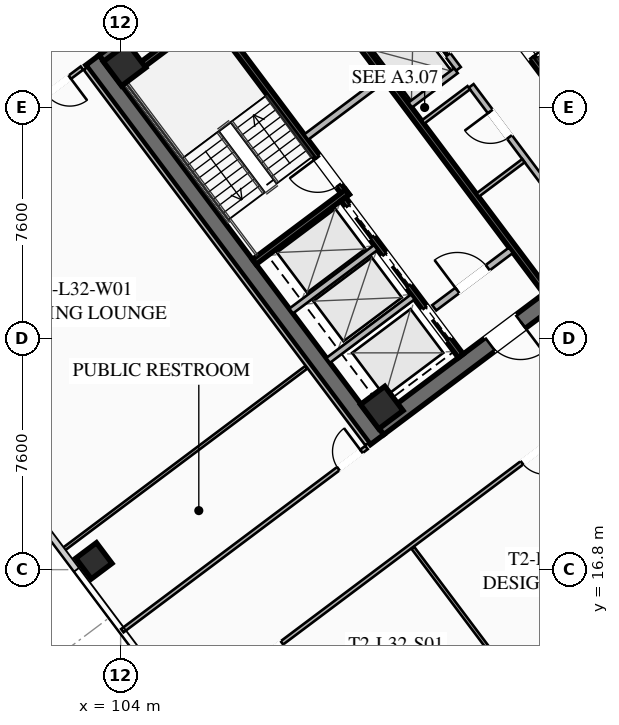
"""IFC4 building model, lengths in metres.
Left out: names, types, materials, properties, quantities, classifications, styles, units other than length and angle.
Written with IfcOpenShell. Run it as: python <this file> out.ifc"""

import sys

from ifc_helpers import new_model, si_unit, direction, frame, frame_2d, origin, origin_2d, place, context, subcontext, project, spatial, rectangle, hollow_rectangle, extrude, element, fill, save


model = new_model("IFC4")
c1 = context("Model", 3, precision=1e-05, world=origin(), true_north=direction((0.0, 1.0)))
c2 = subcontext(c1, "Body", "Model", "MODEL_VIEW")
j1 = project(units=[si_unit("LENGTHUNIT", "METRE"), si_unit("PLANEANGLEUNIT", "RADIAN")], contexts=[c1])
p1 = place(None, origin())
s1 = spatial("IfcSite", under=j1, at=p1, CompositionType="ELEMENT")
p2 = place(p1, origin())
s2 = spatial("IfcBuilding", under=s1, at=p2, CompositionType="ELEMENT")
p3 = place(p2, frame((0.0, 0.0, 121.5)))
s3 = spatial("IfcBuildingStorey", under=s2, at=p3, CompositionType="ELEMENT", Elevation=121.5)
for number, where, z_axis, x_axis in (
    (1, (112.436, 21.077, 0.0), (0.0, 0.0, 1.0), (-0.6, 0.8, 0.0)),
    (2, (115.564, 42.923, 0.0), (0.0, 0.0, 1.0), (0.6, -0.8, 0.0)),
):
    element("IfcWall", number, at=place(p3, frame(where, z_axis=z_axis, x_axis=x_axis)), inside=s3, PredefinedType="SHEAR", context=c2, shape_type="SweptSolid", body=[
        extrude(rectangle(XDim=15.6, YDim=0.55, at=frame_2d((7.8, 0.0))), origin(), (0.0, 0.0, 1.0), 3.55),
    ])
p4 = place(p3, frame((124.539, 30.498, 0.0), z_axis=(0.0, 0.0, 1.0), x_axis=(-0.799998054672, -0.600002593761, 0.0)))
e3 = element("IfcWall", 3, at=p4, inside=s3, PredefinedType="SHEAR", context=c2, shape_type="SweptSolid", body=[
    extrude(rectangle(XDim=15.06, YDim=0.55, at=frame_2d((7.53, 0.0))), origin(), (0.0, 0.0, 1.0), 3.55),
])
p5 = place(p4, frame((9.23, 0.0, 0.0)))
e4 = element("IfcOpeningElement", 4, at=p5, cuts=e3, PredefinedType="OPENING", context=c2, shape_type="SweptSolid", body=[
    extrude(rectangle(XDim=1.25, YDim=2.25, at=frame_2d((0.625, 1.125))), frame((0.0, 0.285, 0.0), z_axis=(0.0, -1.0, 0.0), x_axis=(1.0, 0.0, 0.0)), (0.0, 0.0, 1.0), 0.57),
])
p6 = place(p4, frame((4.18, 0.0, 0.0)))
e5 = element("IfcOpeningElement", 5, at=p6, cuts=e3, PredefinedType="OPENING", context=c2, shape_type="SweptSolid", body=[
    extrude(rectangle(XDim=1.25, YDim=2.25, at=frame_2d((0.625, 1.125))), frame((0.0, 0.285, 0.0), z_axis=(0.0, -1.0, 0.0), x_axis=(1.0, 0.0, 0.0)), (0.0, 0.0, 1.0), 0.57),
])
p7 = place(p3, frame((103.461, 33.502, 0.0), z_axis=(0.0, 0.0, 1.0), x_axis=(0.799998054672, 0.600002593761, 0.0)))
e6 = element("IfcWall", 6, at=p7, inside=s3, PredefinedType="SHEAR", context=c2, shape_type="SweptSolid", body=[
    extrude(rectangle(XDim=15.06, YDim=0.55, at=frame_2d((7.53, 0.0))), origin(), (0.0, 0.0, 1.0), 3.55),
])
p8 = place(p7, frame((4.58, 0.0, 0.0)))
e7 = element("IfcOpeningElement", 7, at=p8, cuts=e6, PredefinedType="OPENING", context=c2, shape_type="SweptSolid", body=[
    extrude(rectangle(XDim=1.25, YDim=2.25, at=frame_2d((0.625, 1.125))), frame((0.0, 0.285, 0.0), z_axis=(0.0, -1.0, 0.0), x_axis=(1.0, 0.0, 0.0)), (0.0, 0.0, 1.0), 0.57),
])
p9 = place(p7, frame((9.63, 0.0, 0.0)))
e8 = element("IfcOpeningElement", 8, at=p9, cuts=e6, PredefinedType="OPENING", context=c2, shape_type="SweptSolid", body=[
    extrude(rectangle(XDim=1.25, YDim=2.25, at=frame_2d((0.625, 1.125))), frame((0.0, 0.285, 0.0), z_axis=(0.0, -1.0, 0.0), x_axis=(1.0, 0.0, 0.0)), (0.0, 0.0, 1.0), 0.57),
])
for number, where, z_axis, x_axis in (
    (9, (112.59, 22.13, 0.0), (0.0, 0.0, 1.0), (0.8, 0.6, 0.0)),
    (10, (104.13, 33.41, 0.0), (0.0, 0.0, 1.0), (0.8, 0.6, 0.0)),
):
    element("IfcColumn", number, at=place(p3, frame(where, z_axis=z_axis, x_axis=x_axis)), inside=s3, PredefinedType="COLUMN", context=c2, shape_type="SweptSolid", body=[
        extrude(hollow_rectangle(XDim=1.0, YDim=1.0, WallThickness=0.04, at=origin_2d()), origin(), (0.0, 0.0, 1.0), 3.37),
    ])
p10 = place(p3, frame((103.12, 17.09, 0.0), z_axis=(0.0, 0.0, 1.0), x_axis=(0.799999996291, 0.600000004945, 0.0)))
e11 = element("IfcColumn", 11, at=p10, inside=s3, PredefinedType="COLUMN", context=c2, shape_type="SweptSolid", body=[
    extrude(hollow_rectangle(XDim=0.85, YDim=0.85, WallThickness=0.035, at=origin_2d()), origin(), (0.0, 0.0, 1.0), 3.37),
])
p11 = place(p3, frame((111.44, 29.08, 0.0), z_axis=(0.0, 0.0, 1.0), x_axis=(-0.59999029481, 0.8000072788, 0.0)))
e12 = element("IfcWall", 12, at=p11, inside=s3, PredefinedType="SHEAR", context=c2, shape_type="SweptSolid", body=[
    extrude(rectangle(XDim=8.05, YDim=0.2, at=frame_2d((4.025, 0.0))), origin(), (0.0, 0.0, 1.0), 3.37),
])
p12 = place(p11, frame((0.45, 0.0, 0.0)))
e13 = element("IfcOpeningElement", 13, at=p12, cuts=e12, PredefinedType="OPENING", context=c2, shape_type="SweptSolid", body=[
    extrude(rectangle(XDim=1.15, YDim=2.2, at=frame_2d((0.575, 1.1))), frame((0.0, 0.11, 0.0), z_axis=(0.0, -1.0, 0.0), x_axis=(1.0, 0.0, 0.0)), (0.0, 0.0, 1.0), 0.22),
])
for number, where, z_axis, x_axis in (
    (14, (108.396, 26.922, 0.0), (0.0, 0.0, 1.0), (0.8, 0.6, 0.0)),
    (15, (103.956, 32.842, 0.0), (0.0, 0.0, 1.0), (0.8, 0.6, 0.0)),
):
    element("IfcWall", number, at=place(p3, frame(where, z_axis=z_axis, x_axis=x_axis)), inside=s3, PredefinedType="SHEAR", context=c2, shape_type="SweptSolid", body=[
        extrude(rectangle(XDim=3.83, YDim=0.2, at=frame_2d((1.915, 0.0))), origin(), (0.0, 0.0, 1.0), 3.37),
    ])
p13 = place(p3, frame((116.56, 34.92, 0.0), z_axis=(0.0, 0.0, 1.0), x_axis=(0.59999029481, -0.8000072788, 0.0)))
e16 = element("IfcWall", 16, at=p13, inside=s3, PredefinedType="SHEAR", context=c2, shape_type="SweptSolid", body=[
    extrude(rectangle(XDim=8.05, YDim=0.2, at=frame_2d((4.025, 0.0))), origin(), (0.0, 0.0, 1.0), 3.37),
])
p14 = place(p13, frame((0.45, 0.0, 0.0)))
e17 = element("IfcOpeningElement", 17, at=p14, cuts=e16, PredefinedType="OPENING", context=c2, shape_type="SweptSolid", body=[
    extrude(rectangle(XDim=1.15, YDim=2.2, at=frame_2d((0.575, 1.1))), frame((0.0, 0.11, 0.0), z_axis=(0.0, -1.0, 0.0), x_axis=(1.0, 0.0, 0.0)), (0.0, 0.0, 1.0), 0.22),
])
p15 = place(p3, frame((117.998, 25.936, 0.0), z_axis=(0.0, 0.0, 1.0), x_axis=(-0.600002693989, 0.799997979501, 0.0)))
e18 = element("IfcWall", 18, at=p15, inside=s3, PredefinedType="SHEAR", context=c2, shape_type="SweptSolid", body=[
    extrude(rectangle(XDim=14.5, YDim=0.2, at=frame_2d((7.25, 0.0))), origin(), (0.0, 0.0, 1.0), 3.37),
])
p16 = place(p3, frame((110.104, 31.028, 0.0), z_axis=(0.0, 0.0, 1.0), x_axis=(0.800018601094, 0.59997519774, 0.0)))
e19 = element("IfcWall", 19, at=p16, inside=s3, PredefinedType="SOLIDWALL", context=c2, shape_type="SweptSolid", body=[
    extrude(rectangle(XDim=3.15, YDim=0.22, at=frame_2d((1.575, 0.0))), origin(), (0.0, 0.0, 1.0), 2.723),
])
p17 = place(p3, frame((114.316, 25.412, 0.0), z_axis=(0.0, 0.0, 1.0), x_axis=(0.800018601094, 0.59997519774, 0.0)))
e20 = element("IfcWall", 20, at=p17, inside=s3, PredefinedType="SOLIDWALL", context=c2, shape_type="SweptSolid", body=[
    extrude(rectangle(XDim=3.15, YDim=0.22, at=frame_2d((1.575, 0.0))), origin(), (0.0, 0.0, 1.0), 2.723),
])
p18 = place(p17, frame((0.95, 0.0, 0.0)))
e21 = element("IfcOpeningElement", 21, at=p18, cuts=e20, PredefinedType="OPENING", context=c2, shape_type="SweptSolid", body=[
    extrude(rectangle(XDim=1.25, YDim=2.25, at=frame_2d((0.625, 1.125))), frame((0.0, 0.12, 0.0), z_axis=(0.0, -1.0, 0.0), x_axis=(1.0, 0.0, 0.0)), (0.0, 0.0, 1.0), 0.24),
])
p19 = place(p3, frame((115.19, 23.83, 0.0), z_axis=(0.0, 0.0, 1.0), x_axis=(-0.599993943644, 0.800004542231, 0.0)))
e22 = element("IfcWall", 22, at=p19, inside=s3, PredefinedType="SHEAR", context=c2, shape_type="SweptSolid", body=[
    extrude(rectangle(XDim=6.45, YDim=0.2, at=frame_2d((3.225, 0.0))), origin(), (0.0, 0.0, 1.0), 3.37),
])
p20 = place(p19, frame((4.875, 0.0, 0.0)))
e23 = element("IfcOpeningElement", 23, at=p20, cuts=e22, PredefinedType="OPENING", context=c2, shape_type="SweptSolid", body=[
    extrude(rectangle(XDim=1.3, YDim=2.25, at=frame_2d((0.65, 1.125))), frame((0.0, 0.11, 0.0), z_axis=(0.0, -1.0, 0.0), x_axis=(1.0, 0.0, 0.0)), (0.0, 0.0, 1.0), 0.22),
])
p21 = place(p19, frame((2.875, 0.0, 0.0)))
e24 = element("IfcOpeningElement", 24, at=p21, cuts=e22, PredefinedType="OPENING", context=c2, shape_type="SweptSolid", body=[
    extrude(rectangle(XDim=1.3, YDim=2.25, at=frame_2d((0.65, 1.125))), frame((0.0, 0.11, 0.0), z_axis=(0.0, -1.0, 0.0), x_axis=(1.0, 0.0, 0.0)), (0.0, 0.0, 1.0), 0.22),
])
p22 = place(p19, frame((0.675, 0.0, 0.0)))
e25 = element("IfcOpeningElement", 25, at=p22, cuts=e22, PredefinedType="OPENING", context=c2, shape_type="SweptSolid", body=[
    extrude(rectangle(XDim=1.3, YDim=2.25, at=frame_2d((0.65, 1.125))), frame((0.0, 0.11, 0.0), z_axis=(0.0, -1.0, 0.0), x_axis=(1.0, 0.0, 0.0)), (0.0, 0.0, 1.0), 0.22),
])
for number, where, z_axis, x_axis in (
    (26, (110.826, 23.682, 0.0), (0.0, 0.0, 1.0), (0.8, 0.6, 0.0)),
    (27, (109.608, 25.306, 0.0), (0.0, 0.0, 1.0), (0.8, 0.6, 0.0)),
):
    element("IfcWall", number, at=place(p3, frame(where, z_axis=z_axis, x_axis=x_axis)), inside=s3, PredefinedType="SOLIDWALL", context=c2, shape_type="SweptSolid", body=[
        extrude(rectangle(XDim=3.48, YDim=0.2, at=frame_2d((1.74, 0.0))), origin(), (0.0, 0.0, 1.0), 3.37),
    ])
p23 = place(p3, frame((119.67, 27.19, 0.0), z_axis=(0.0, 0.0, 1.0), x_axis=(-0.599988677396, 0.800008491828, 0.0)))
e28 = element("IfcWall", 28, at=p23, inside=s3, PredefinedType="SOLIDWALL", context=c2, shape_type="SweptSolid", body=[
    extrude(rectangle(XDim=6.9, YDim=0.2, at=frame_2d((3.45, 0.0))), origin(), (0.0, 0.0, 1.0), 2.723),
])
p24 = place(p23, frame((0.85, 0.0, 0.0)))
e29 = element("IfcOpeningElement", 29, at=p24, cuts=e28, PredefinedType="OPENING", context=c2, shape_type="SweptSolid", body=[
    extrude(rectangle(XDim=0.95, YDim=2.05, at=frame_2d((0.475, 1.025))), frame((0.0, 0.11, 0.0), z_axis=(0.0, -1.0, 0.0), x_axis=(1.0, 0.0, 0.0)), (0.0, 0.0, 1.0), 0.22),
])
p25 = place(p23, frame((4.8, 0.0, 0.0)))
e30 = element("IfcOpeningElement", 30, at=p25, cuts=e28, PredefinedType="OPENING", context=c2, shape_type="SweptSolid", body=[
    extrude(rectangle(XDim=1.05, YDim=2.2, at=frame_2d((0.525, 1.1))), frame((0.0, 0.11, 0.0), z_axis=(0.0, -1.0, 0.0), x_axis=(1.0, 0.0, 0.0)), (0.0, 0.0, 1.0), 0.22),
])
for number, where, z_axis, x_axis in (
    (31, (113.946, 31.522, 0.0), (0.0, 0.0, 1.0), (0.8, 0.6, 0.0)),
    (32, (115.746, 29.122, 0.0), (0.0, 0.0, 1.0), (0.8, 0.6, 0.0)),
):
    element("IfcWall", number, at=place(p3, frame(where, z_axis=z_axis, x_axis=x_axis)), inside=s3, PredefinedType="PARTITIONING", context=c2, shape_type="SweptSolid", body=[
        extrude(rectangle(XDim=1.88, YDim=0.135, at=frame_2d((0.94, 0.0))), origin(), (0.0, 0.0, 1.0), 2.723),
    ])
p26 = place(p3, frame((115.11, 33.27, 0.0), z_axis=(0.0, 0.0, 1.0), x_axis=(-0.600011322243, 0.799991508192, 0.0)))
e33 = element("IfcWall", 33, at=p26, inside=s3, PredefinedType="SOLIDWALL", context=c2, shape_type="SweptSolid", body=[
    extrude(rectangle(XDim=6.9, YDim=0.2, at=frame_2d((3.45, 0.0))), origin(), (0.0, 0.0, 1.0), 3.37),
])
p27 = place(p26, frame((0.575, 0.0, 0.0)))
e34 = element("IfcOpeningElement", 34, at=p27, cuts=e33, PredefinedType="OPENING", context=c2, shape_type="SweptSolid", body=[
    extrude(rectangle(XDim=1.1, YDim=2.2, at=frame_2d((0.55, 1.1))), frame((0.0, 0.11, 0.0), z_axis=(0.0, -1.0, 0.0), x_axis=(1.0, 0.0, 0.0)), (0.0, 0.0, 1.0), 0.22),
])
p28 = place(p26, frame((2.825, 0.0, 0.0)))
e35 = element("IfcOpeningElement", 35, at=p28, cuts=e33, PredefinedType="OPENING", context=c2, shape_type="SweptSolid", body=[
    extrude(rectangle(XDim=1.1, YDim=2.2, at=frame_2d((0.55, 1.1))), frame((0.0, 0.11, 0.0), z_axis=(0.0, -1.0, 0.0), x_axis=(1.0, 0.0, 0.0)), (0.0, 0.0, 1.0), 0.22),
])
p29 = place(p26, frame((5.075, 0.0, 0.0)))
e36 = element("IfcOpeningElement", 36, at=p29, cuts=e33, PredefinedType="OPENING", context=c2, shape_type="SweptSolid", body=[
    extrude(rectangle(XDim=1.1, YDim=2.2, at=frame_2d((0.55, 1.1))), frame((0.0, 0.11, 0.0), z_axis=(0.0, -1.0, 0.0), x_axis=(1.0, 0.0, 0.0)), (0.0, 0.0, 1.0), 0.22),
])
p30 = place(p3, frame((113.526, 32.082, 0.0), z_axis=(0.0, 0.0, 1.0), x_axis=(0.800046745961, 0.599937666993, 0.0)))
e37 = element("IfcWall", 37, at=p30, inside=s3, PredefinedType="SOLIDWALL", context=c2, shape_type="SweptSolid", body=[
    extrude(rectangle(XDim=1.88, YDim=0.2, at=frame_2d((0.94, 0.0))), origin(), (0.0, 0.0, 1.0), 3.37),
])
p31 = place(p3, frame((112.176, 33.882, 0.0), z_axis=(0.0, 0.0, 1.0), x_axis=(0.8, 0.6, 0.0)))
e38 = element("IfcWall", 38, at=p31, inside=s3, PredefinedType="SOLIDWALL", context=c2, shape_type="SweptSolid", body=[
    extrude(rectangle(XDim=1.88, YDim=0.2, at=frame_2d((0.94, 0.0))), origin(), (0.0, 0.0, 1.0), 3.37),
])
p32 = place(p3, frame((95.87, 30.09, 0.0), z_axis=(0.0, 0.0, 1.0), x_axis=(0.799997191971, 0.600003744021, 0.0)))
e39 = element("IfcWall", 39, at=p32, inside=s3, PredefinedType="PARTITIONING", context=c2, shape_type="SweptSolid", body=[
    extrude(rectangle(XDim=31.3, YDim=0.135, at=frame_2d((15.65, 0.0))), origin(), (0.0, 0.0, 1.0), 2.723),
])
p33 = place(p32, frame((0.3, 0.0, 0.0)))
e40 = element("IfcOpeningElement", 40, at=p33, cuts=e39, PredefinedType="OPENING", context=c2, shape_type="SweptSolid", body=[
    extrude(rectangle(XDim=0.95, YDim=2.05, at=frame_2d((0.475, 1.025))), frame((0.0, 0.077, 0.0), z_axis=(0.0, -1.0, 0.0), x_axis=(1.0, 0.0, 0.0)), (0.0, 0.0, 1.0), 0.155),
])
p34 = place(p32, frame((30.05, 0.0, 0.0)))
e41 = element("IfcOpeningElement", 41, at=p34, cuts=e39, PredefinedType="OPENING", context=c2, shape_type="SweptSolid", body=[
    extrude(rectangle(XDim=0.95, YDim=2.05, at=frame_2d((0.475, 1.025))), frame((0.0, 0.077, 0.0), z_axis=(0.0, -1.0, 0.0), x_axis=(1.0, 0.0, 0.0)), (0.0, 0.0, 1.0), 0.155),
])
p35 = place(p3, frame((133.282, 32.374, 0.0), z_axis=(0.0, 0.0, 1.0), x_axis=(-0.8, -0.6, 0.0)))
e42 = element("IfcWall", 42, at=p35, inside=s3, PredefinedType="PARTITIONING", context=c2, shape_type="SweptSolid", body=[
    extrude(rectangle(XDim=31.3, YDim=0.135, at=frame_2d((15.65, 0.0))), origin(), (0.0, 0.0, 1.0), 2.723),
])
p36 = place(p35, frame((29.97, 0.0, 0.0)))
e43 = element("IfcOpeningElement", 43, at=p36, cuts=e42, PredefinedType="OPENING", context=c2, shape_type="SweptSolid", body=[
    extrude(rectangle(XDim=0.95, YDim=2.05, at=frame_2d((0.475, 1.025))), frame((0.0, 0.077, 0.0), z_axis=(0.0, -1.0, 0.0), x_axis=(1.0, 0.0, 0.0)), (0.0, 0.0, 1.0), 0.155),
])
p37 = place(p35, frame((19.151, 0.0, 0.0)))
e44 = element("IfcOpeningElement", 44, at=p37, cuts=e42, PredefinedType="OPENING", context=c2, shape_type="SweptSolid", body=[
    extrude(rectangle(XDim=0.95, YDim=2.05, at=frame_2d((0.475, 1.025))), frame((0.0, 0.077, 0.0), z_axis=(0.0, -1.0, 0.0), x_axis=(1.0, 0.0, 0.0)), (0.0, 0.0, 1.0), 0.155),
])
p38 = place(p35, frame((14.901, 0.0, 0.0)))
e45 = element("IfcOpeningElement", 45, at=p38, cuts=e42, PredefinedType="OPENING", context=c2, shape_type="SweptSolid", body=[
    extrude(rectangle(XDim=0.95, YDim=2.05, at=frame_2d((0.475, 1.025))), frame((0.0, 0.077, 0.0), z_axis=(0.0, -1.0, 0.0), x_axis=(1.0, 0.0, 0.0)), (0.0, 0.0, 1.0), 0.155),
])
p39 = place(p35, frame((10.92, 0.0, 0.0)))
e46 = element("IfcOpeningElement", 46, at=p39, cuts=e42, PredefinedType="OPENING", context=c2, shape_type="SweptSolid", body=[
    extrude(rectangle(XDim=0.95, YDim=2.05, at=frame_2d((0.475, 1.025))), frame((0.0, 0.077, 0.0), z_axis=(0.0, -1.0, 0.0), x_axis=(1.0, 0.0, 0.0)), (0.0, 0.0, 1.0), 0.155),
])
p40 = place(p35, frame((0.38, 0.0, 0.0)))
e47 = element("IfcOpeningElement", 47, at=p40, cuts=e42, PredefinedType="OPENING", context=c2, shape_type="SweptSolid", body=[
    extrude(rectangle(XDim=0.95, YDim=2.05, at=frame_2d((0.475, 1.025))), frame((0.0, 0.077, 0.0), z_axis=(0.0, -1.0, 0.0), x_axis=(1.0, 0.0, 0.0)), (0.0, 0.0, 1.0), 0.155),
])
p41 = place(p3, frame((117.768, 11.976, 0.0), z_axis=(0.0, 0.0, 1.0), x_axis=(-0.6, 0.8, 0.0)))
e48 = element("IfcWall", 48, at=p41, inside=s3, PredefinedType="PARTITIONING", context=c2, shape_type="SweptSolid", body=[
    extrude(rectangle(XDim=6.93, YDim=0.11, at=frame_2d((3.465, 0.0))), origin(), (0.0, 0.0, 1.0), 2.723),
])
p42 = place(p3, frame((112.104, 20.928, 0.0), z_axis=(0.0, 0.0, 1.0), x_axis=(-0.599994940075, 0.800003794918, 0.0)))
e49 = element("IfcWall", 49, at=p42, inside=s3, PredefinedType="PARTITIONING", context=c2, shape_type="SweptSolid", body=[
    extrude(rectangle(XDim=15.44, YDim=0.135, at=frame_2d((7.72, 0.0))), origin(), (0.0, 0.0, 1.0), 2.723),
])
p43 = place(p3, frame((102.728, 33.296, 0.0), z_axis=(0.0, 0.0, 1.0), x_axis=(-0.800002918023, -0.599996109283, 0.0)))
e50 = element("IfcWall", 50, at=p43, inside=s3, PredefinedType="PARTITIONING", context=c2, shape_type="SweptSolid", body=[
    extrude(rectangle(XDim=10.04, YDim=0.135, at=frame_2d((5.02, 0.0))), origin(), (0.0, 0.0, 1.0), 2.723),
])
p44 = place(p43, frame((0.5, 0.0, 0.0)))
e51 = element("IfcOpeningElement", 51, at=p44, cuts=e50, PredefinedType="OPENING", context=c2, shape_type="SweptSolid", body=[
    extrude(rectangle(XDim=0.95, YDim=2.05, at=frame_2d((0.475, 1.025))), frame((0.0, 0.077, 0.0), z_axis=(0.0, -1.0, 0.0), x_axis=(1.0, 0.0, 0.0)), (0.0, 0.0, 1.0), 0.155),
])
p45 = place(p3, frame((104.056, 14.792, 0.0), z_axis=(0.0, 0.0, 1.0), x_axis=(0.800002918023, 0.599996109283, 0.0)))
e52 = element("IfcWall", 52, at=p45, inside=s3, PredefinedType="PARTITIONING", context=c2, shape_type="SweptSolid", body=[
    extrude(rectangle(XDim=10.04, YDim=0.135, at=frame_2d((5.02, 0.0))), origin(), (0.0, 0.0, 1.0), 2.723),
])
p46 = place(p45, frame((8.88, 0.0, 0.0)))
e53 = element("IfcOpeningElement", 53, at=p46, cuts=e52, PredefinedType="OPENING", context=c2, shape_type="SweptSolid", body=[
    extrude(rectangle(XDim=0.95, YDim=2.05, at=frame_2d((0.475, 1.025))), frame((0.0, 0.077, 0.0), z_axis=(0.0, -1.0, 0.0), x_axis=(1.0, 0.0, 0.0)), (0.0, 0.0, 1.0), 0.155),
])
p47 = place(p3, frame((102.076, 17.432, 0.0), z_axis=(0.0, 0.0, 1.0), x_axis=(0.799991245945, 0.600011671896, 0.0)))
e54 = element("IfcWall", 54, at=p47, inside=s3, PredefinedType="PARTITIONING", context=c2, shape_type="SweptSolid", body=[
    extrude(rectangle(XDim=10.04, YDim=0.11, at=frame_2d((5.02, 0.0))), origin(), (0.0, 0.0, 1.0), 2.723),
])
p48 = place(p5, origin())
e55 = element("IfcDoor", 55, at=p48, inside=s3, OperationType="SINGLE_SWING_LEFT", PredefinedType="DOOR", context=c2, shape_type="SweptSolid", body=[
    extrude(rectangle(XDim=1.25, YDim=2.25, at=frame_2d((0.625, 1.125))), frame((0.0, 0.025, 0.0), z_axis=(0.0, -1.0, 0.0), x_axis=(1.0, 0.0, 0.0)), (0.0, 0.0, 1.0), 0.05),
])
fill(e4, e55)
p49 = place(p12, origin())
e56 = element("IfcDoor", 56, at=p49, inside=s3, OperationType="SINGLE_SWING_RIGHT", PredefinedType="DOOR", context=c2, shape_type="SweptSolid", body=[
    extrude(rectangle(XDim=1.15, YDim=2.2, at=frame_2d((0.575, 1.1))), frame((0.0, 0.025, 0.0), z_axis=(0.0, -1.0, 0.0), x_axis=(1.0, 0.0, 0.0)), (0.0, 0.0, 1.0), 0.05),
])
fill(e13, e56)
p50 = place(p14, origin())
e57 = element("IfcDoor", 57, at=p50, inside=s3, OperationType="SINGLE_SWING_RIGHT", PredefinedType="DOOR", context=c2, shape_type="SweptSolid", body=[
    extrude(rectangle(XDim=1.15, YDim=2.2, at=frame_2d((0.575, 1.1))), frame((0.0, 0.025, 0.0), z_axis=(0.0, -1.0, 0.0), x_axis=(1.0, 0.0, 0.0)), (0.0, 0.0, 1.0), 0.05),
])
fill(e17, e57)
p51 = place(p18, origin())
e58 = element("IfcDoor", 58, at=p51, inside=s3, OperationType="SINGLE_SWING_LEFT", PredefinedType="DOOR", context=c2, shape_type="SweptSolid", body=[
    extrude(rectangle(XDim=1.25, YDim=2.25, at=frame_2d((0.625, 1.125))), frame((0.0, 0.025, 0.0), z_axis=(0.0, -1.0, 0.0), x_axis=(1.0, 0.0, 0.0)), (0.0, 0.0, 1.0), 0.05),
])
fill(e21, e58)
p52 = place(p25, origin())
e59 = element("IfcDoor", 59, at=p52, inside=s3, OperationType="SINGLE_SWING_RIGHT", PredefinedType="DOOR", context=c2, shape_type="SweptSolid", body=[
    extrude(rectangle(XDim=1.05, YDim=2.2, at=frame_2d((0.525, 1.1))), frame((0.0, 0.025, 0.0), z_axis=(0.0, -1.0, 0.0), x_axis=(1.0, 0.0, 0.0)), (0.0, 0.0, 1.0), 0.05),
])
fill(e30, e59)
p53 = place(p36, origin())
e60 = element("IfcDoor", 60, at=p53, inside=s3, OperationType="SINGLE_SWING_RIGHT", PredefinedType="DOOR", context=c2, shape_type="SweptSolid", body=[
    extrude(rectangle(XDim=0.95, YDim=2.05, at=frame_2d((0.475, 1.025))), frame((0.0, 0.025, 0.0), z_axis=(0.0, -1.0, 0.0), x_axis=(1.0, 0.0, 0.0)), (0.0, 0.0, 1.0), 0.05),
])
fill(e43, e60)
p54 = place(p37, origin())
e61 = element("IfcDoor", 61, at=p54, inside=s3, OperationType="SINGLE_SWING_LEFT", PredefinedType="DOOR", context=c2, shape_type="SweptSolid", body=[
    extrude(rectangle(XDim=0.95, YDim=2.05, at=frame_2d((0.475, 1.025))), frame((0.0, 0.025, 0.0), z_axis=(0.0, -1.0, 0.0), x_axis=(1.0, 0.0, 0.0)), (0.0, 0.0, 1.0), 0.05),
])
fill(e44, e61)
p55 = place(p44, origin())
e62 = element("IfcDoor", 62, at=p55, inside=s3, OperationType="SINGLE_SWING_LEFT", PredefinedType="DOOR", context=c2, shape_type="SweptSolid", body=[
    extrude(rectangle(XDim=0.95, YDim=2.05, at=frame_2d((0.475, 1.025))), frame((0.0, 0.025, 0.0), z_axis=(0.0, -1.0, 0.0), x_axis=(1.0, 0.0, 0.0)), (0.0, 0.0, 1.0), 0.05),
])
fill(e51, e62)
p56 = place(p46, origin())
e63 = element("IfcDoor", 63, at=p56, inside=s3, OperationType="SINGLE_SWING_RIGHT", PredefinedType="DOOR", context=c2, shape_type="SweptSolid", body=[
    extrude(rectangle(XDim=0.95, YDim=2.05, at=frame_2d((0.475, 1.025))), frame((0.0, 0.025, 0.0), z_axis=(0.0, -1.0, 0.0), x_axis=(1.0, 0.0, 0.0)), (0.0, 0.0, 1.0), 0.05),
])
fill(e53, e63)
p57 = place(p20, origin())
e64 = element("IfcDoor", 64, at=p57, inside=s3, OperationType="SLIDING_TO_LEFT", PredefinedType="DOOR", context=c2, shape_type="SweptSolid", body=[
    extrude(rectangle(XDim=1.3, YDim=2.25, at=frame_2d((0.65, 1.125))), frame((0.0, 0.025, 0.0), z_axis=(0.0, -1.0, 0.0), x_axis=(1.0, 0.0, 0.0)), (0.0, 0.0, 1.0), 0.05),
])
fill(e23, e64)
p58 = place(p21, origin())
e65 = element("IfcDoor", 65, at=p58, inside=s3, OperationType="SLIDING_TO_LEFT", PredefinedType="DOOR", context=c2, shape_type="SweptSolid", body=[
    extrude(rectangle(XDim=1.3, YDim=2.25, at=frame_2d((0.65, 1.125))), frame((0.0, 0.025, 0.0), z_axis=(0.0, -1.0, 0.0), x_axis=(1.0, 0.0, 0.0)), (0.0, 0.0, 1.0), 0.05),
])
fill(e24, e65)
p59 = place(p22, origin())
e66 = element("IfcDoor", 66, at=p59, inside=s3, OperationType="SLIDING_TO_LEFT", PredefinedType="DOOR", context=c2, shape_type="SweptSolid", body=[
    extrude(rectangle(XDim=1.3, YDim=2.25, at=frame_2d((0.65, 1.125))), frame((0.0, 0.025, 0.0), z_axis=(0.0, -1.0, 0.0), x_axis=(1.0, 0.0, 0.0)), (0.0, 0.0, 1.0), 0.05),
])
fill(e25, e66)
p60 = place(p27, origin())
e67 = element("IfcDoor", 67, at=p60, inside=s3, OperationType="SLIDING_TO_LEFT", PredefinedType="DOOR", context=c2, shape_type="SweptSolid", body=[
    extrude(rectangle(XDim=1.1, YDim=2.2, at=frame_2d((0.55, 1.1))), frame((0.0, 0.025, 0.0), z_axis=(0.0, -1.0, 0.0), x_axis=(1.0, 0.0, 0.0)), (0.0, 0.0, 1.0), 0.05),
])
fill(e34, e67)
save(model, sys.argv[1])
